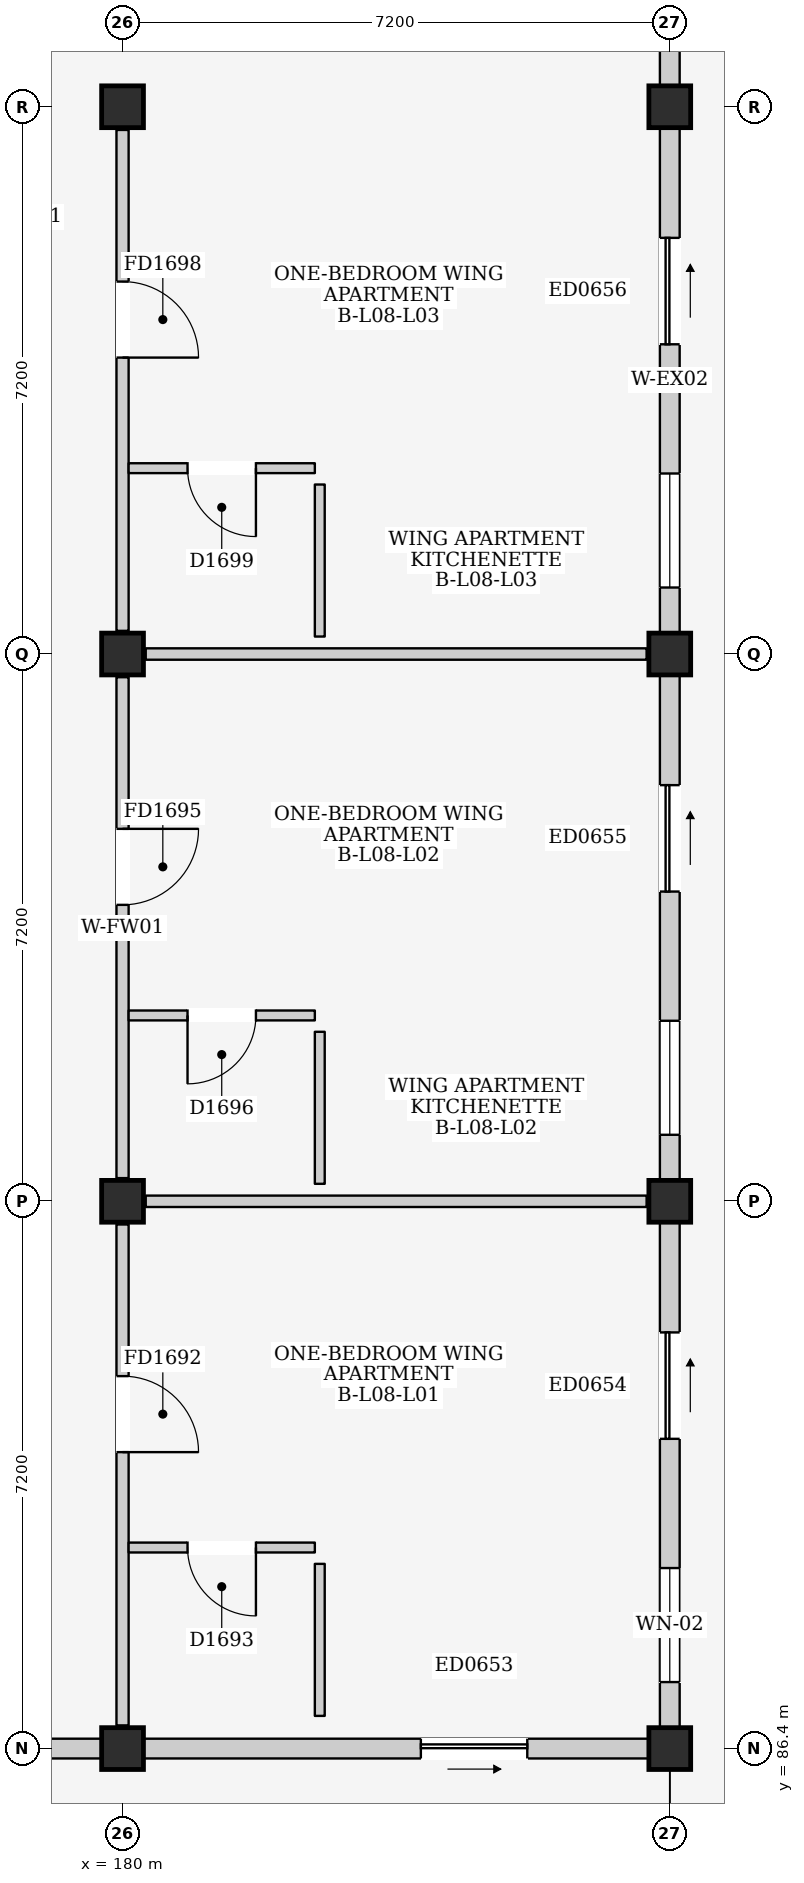
"""IFC4 building model, lengths in metres.
Left out: names, types, materials, properties, quantities, classifications, styles, units other than length and angle.
Written with IfcOpenShell. Run it as: python <this file> out.ifc"""

import sys

from ifc_helpers import new_model, si_unit, direction, frame, frame_2d, origin, origin_2d, place, context, subcontext, project, spatial, rectangle, extrude, element, fill, save


model = new_model("IFC4")
c1 = context("Model", 3, precision=1e-05, world=origin(), true_north=direction((0.0, 1.0)))
c2 = subcontext(c1, "Body", "Model", "MODEL_VIEW")
j1 = project(units=[si_unit("LENGTHUNIT", "METRE"), si_unit("PLANEANGLEUNIT", "RADIAN")], contexts=[c1])
p1 = place(None, origin())
s1 = spatial("IfcSite", under=j1, at=p1, CompositionType="ELEMENT")
p2 = place(p1, origin())
s2 = spatial("IfcBuilding", under=s1, at=p2, CompositionType="ELEMENT")
p3 = place(p2, frame((0.0, 0.0, 28.3)))
s3 = spatial("IfcBuildingStorey", under=s2, at=p3, CompositionType="ELEMENT", Elevation=28.3)
for number, where, z_axis, x_axis in (
    (1, (180.0, 86.4, 0.0), (0.0, 0.0, 1.0), (1.0, 0.0, 0.0)),
    (2, (180.0, 93.6, 0.0), (0.0, 0.0, 1.0), (1.0, 0.0, 0.0)),
    (3, (180.0, 100.8, 0.0), (0.0, 0.0, 1.0), (1.0, 0.0, 0.0)),
    (4, (180.0, 108.0, 0.0), (0.0, 0.0, 1.0), (1.0, 0.0, 0.0)),
    (5, (187.2, 86.4, 0.0), (0.0, 0.0, 1.0), (1.0, 0.0, 0.0)),
    (6, (187.2, 93.6, 0.0), (0.0, 0.0, 1.0), (1.0, 0.0, 0.0)),
    (7, (187.2, 100.8, 0.0), (0.0, 0.0, 1.0), (1.0, 0.0, 0.0)),
    (8, (187.2, 108.0, 0.0), (0.0, 0.0, 1.0), (1.0, 0.0, 0.0)),
):
    element("IfcColumn", number, at=place(p3, frame(where, z_axis=z_axis, x_axis=x_axis)), inside=s3, PredefinedType="COLUMN", context=c2, shape_type="SweptSolid", body=[
        extrude(rectangle(XDim=0.55, YDim=0.55, at=origin_2d()), origin(), (0.0, 0.0, 1.0), 3.2),
    ])
p4 = place(p3, frame((173.075, 86.4, 0.0), z_axis=(0.0, 0.0, 1.0), x_axis=(1.0, 0.0, 0.0)))
e9 = element("IfcWall", 9, at=p4, inside=s3, PredefinedType="ELEMENTEDWALL", context=c2, shape_type="SweptSolid", body=[
    extrude(rectangle(XDim=6.65, YDim=0.26, at=frame_2d((3.325, 0.0))), origin(), (0.0, 0.0, 1.0), 2.335),
])
p5 = place(p4, frame((2.825, 0.0, 1.1)))
e10 = element("IfcOpeningElement", 10, at=p5, cuts=e9, PredefinedType="OPENING", context=c2, shape_type="SweptSolid", body=[
    extrude(rectangle(XDim=1.0, YDim=0.9, at=frame_2d((0.5, 0.45))), frame((0.0, 0.145, 0.0), z_axis=(0.0, -1.0, 0.0), x_axis=(1.0, 0.0, 0.0)), (0.0, 0.0, 1.0), 0.29),
])
p6 = place(p3, frame((180.275, 86.4, 0.0), z_axis=(0.0, 0.0, 1.0), x_axis=(1.0, 0.0, 0.0)))
e11 = element("IfcWall", 11, at=p6, inside=s3, PredefinedType="ELEMENTEDWALL", context=c2, shape_type="SweptSolid", body=[
    extrude(rectangle(XDim=6.65, YDim=0.26, at=frame_2d((3.325, 0.0))), origin(), (0.0, 0.0, 1.0), 2.335),
])
p7 = place(p6, frame((3.65, 0.0, 0.0)))
e12 = element("IfcOpeningElement", 12, at=p7, cuts=e11, PredefinedType="OPENING", context=c2, shape_type="SweptSolid", body=[
    extrude(rectangle(XDim=1.4, YDim=2.1, at=frame_2d((0.7, 1.05))), frame((0.0, 0.145, 0.0), z_axis=(0.0, -1.0, 0.0), x_axis=(1.0, 0.0, 0.0)), (0.0, 0.0, 1.0), 0.29),
])
p8 = place(p3, frame((187.2, 86.675, 0.0), z_axis=(0.0, 0.0, 1.0), x_axis=(0.0, 1.0, 0.0)))
e13 = element("IfcWall", 13, at=p8, inside=s3, PredefinedType="ELEMENTEDWALL", context=c2, shape_type="SweptSolid", body=[
    extrude(rectangle(XDim=6.65, YDim=0.26, at=frame_2d((3.325, 0.0))), origin(), (0.0, 0.0, 1.0), 2.485),
])
p9 = place(p8, frame((3.8, 0.0, 0.0)))
e14 = element("IfcOpeningElement", 14, at=p9, cuts=e13, PredefinedType="OPENING", context=c2, shape_type="SweptSolid", body=[
    extrude(rectangle(XDim=1.4, YDim=2.1, at=frame_2d((0.7, 1.05))), frame((0.0, 0.145, 0.0), z_axis=(0.0, -1.0, 0.0), x_axis=(1.0, 0.0, 0.0)), (0.0, 0.0, 1.0), 0.29),
])
p10 = place(p8, frame((0.6, 0.0, 0.875)))
e15 = element("IfcOpeningElement", 15, at=p10, cuts=e13, PredefinedType="OPENING", context=c2, shape_type="SweptSolid", body=[
    extrude(rectangle(XDim=1.5, YDim=1.5, at=frame_2d((0.75, 0.75))), frame((0.0, 0.145, 0.0), z_axis=(0.0, -1.0, 0.0), x_axis=(1.0, 0.0, 0.0)), (0.0, 0.0, 1.0), 0.29),
])
p11 = place(p3, frame((187.2, 93.875, 0.0), z_axis=(0.0, 0.0, 1.0), x_axis=(0.0, 1.0, 0.0)))
e16 = element("IfcWall", 16, at=p11, inside=s3, PredefinedType="ELEMENTEDWALL", context=c2, shape_type="SweptSolid", body=[
    extrude(rectangle(XDim=6.65, YDim=0.26, at=frame_2d((3.325, 0.0))), origin(), (0.0, 0.0, 1.0), 2.485),
])
p12 = place(p11, frame((3.8, 0.0, 0.0)))
e17 = element("IfcOpeningElement", 17, at=p12, cuts=e16, PredefinedType="OPENING", context=c2, shape_type="SweptSolid", body=[
    extrude(rectangle(XDim=1.4, YDim=2.1, at=frame_2d((0.7, 1.05))), frame((0.0, 0.145, 0.0), z_axis=(0.0, -1.0, 0.0), x_axis=(1.0, 0.0, 0.0)), (0.0, 0.0, 1.0), 0.29),
])
p13 = place(p11, frame((0.6, 0.0, 0.875)))
e18 = element("IfcOpeningElement", 18, at=p13, cuts=e16, PredefinedType="OPENING", context=c2, shape_type="SweptSolid", body=[
    extrude(rectangle(XDim=1.5, YDim=1.5, at=frame_2d((0.75, 0.75))), frame((0.0, 0.145, 0.0), z_axis=(0.0, -1.0, 0.0), x_axis=(1.0, 0.0, 0.0)), (0.0, 0.0, 1.0), 0.29),
])
p14 = place(p3, frame((187.2, 101.075, 0.0), z_axis=(0.0, 0.0, 1.0), x_axis=(0.0, 1.0, 0.0)))
e19 = element("IfcWall", 19, at=p14, inside=s3, PredefinedType="ELEMENTEDWALL", context=c2, shape_type="SweptSolid", body=[
    extrude(rectangle(XDim=6.65, YDim=0.26, at=frame_2d((3.325, 0.0))), origin(), (0.0, 0.0, 1.0), 2.485),
])
p15 = place(p14, frame((3.8, 0.0, 0.0)))
e20 = element("IfcOpeningElement", 20, at=p15, cuts=e19, PredefinedType="OPENING", context=c2, shape_type="SweptSolid", body=[
    extrude(rectangle(XDim=1.4, YDim=2.1, at=frame_2d((0.7, 1.05))), frame((0.0, 0.145, 0.0), z_axis=(0.0, -1.0, 0.0), x_axis=(1.0, 0.0, 0.0)), (0.0, 0.0, 1.0), 0.29),
])
p16 = place(p14, frame((0.6, 0.0, 0.875)))
e21 = element("IfcOpeningElement", 21, at=p16, cuts=e19, PredefinedType="OPENING", context=c2, shape_type="SweptSolid", body=[
    extrude(rectangle(XDim=1.5, YDim=1.5, at=frame_2d((0.75, 0.75))), frame((0.0, 0.145, 0.0), z_axis=(0.0, -1.0, 0.0), x_axis=(1.0, 0.0, 0.0)), (0.0, 0.0, 1.0), 0.29),
])
p17 = place(p3, frame((187.2, 108.275, 0.0), z_axis=(0.0, 0.0, 1.0), x_axis=(0.0, 1.0, 0.0)))
e22 = element("IfcWall", 22, at=p17, inside=s3, PredefinedType="ELEMENTEDWALL", context=c2, shape_type="SweptSolid", body=[
    extrude(rectangle(XDim=6.65, YDim=0.26, at=frame_2d((3.325, 0.0))), origin(), (0.0, 0.0, 1.0), 2.485),
])
p18 = place(p17, frame((3.65, 0.0, 0.0)))
e23 = element("IfcOpeningElement", 23, at=p18, cuts=e22, PredefinedType="OPENING", context=c2, shape_type="SweptSolid", body=[
    extrude(rectangle(XDim=1.4, YDim=2.1, at=frame_2d((0.7, 1.05))), frame((0.0, 0.145, 0.0), z_axis=(0.0, -1.0, 0.0), x_axis=(1.0, 0.0, 0.0)), (0.0, 0.0, 1.0), 0.29),
])
p19 = place(p3, frame((180.0, 86.705, 0.0), z_axis=(0.0, 0.0, 1.0), x_axis=(0.0, 1.0, 0.0)))
e24 = element("IfcWall", 24, at=p19, inside=s3, PredefinedType="PARTITIONING", context=c2, shape_type="SweptSolid", body=[
    extrude(rectangle(XDim=6.59, YDim=0.16, at=frame_2d((3.295, 0.0))), origin(), (0.0, 0.0, 1.0), 2.435),
])
p20 = place(p19, frame((3.595, 0.0, 0.0)))
e25 = element("IfcOpeningElement", 25, at=p20, cuts=e24, PredefinedType="OPENING", context=c2, shape_type="SweptSolid", body=[
    extrude(rectangle(XDim=1.0, YDim=2.15, at=frame_2d((0.5, 1.075))), frame((0.0, 0.095, 0.0), z_axis=(0.0, -1.0, 0.0), x_axis=(1.0, 0.0, 0.0)), (0.0, 0.0, 1.0), 0.19),
])
p21 = place(p3, frame((180.305, 93.6, 0.0), z_axis=(0.0, 0.0, 1.0), x_axis=(1.0, 0.0, 0.0)))
e26 = element("IfcWall", 26, at=p21, inside=s3, PredefinedType="PARTITIONING", context=c2, shape_type="SweptSolid", body=[
    extrude(rectangle(XDim=6.59, YDim=0.15, at=frame_2d((3.295, 0.0))), origin(), (0.0, 0.0, 1.0), 2.335),
])
p22 = place(p3, frame((180.08, 89.045, 0.0), z_axis=(0.0, 0.0, 1.0), x_axis=(1.0, 0.0, 0.0)))
e27 = element("IfcWall", 27, at=p22, inside=s3, PredefinedType="PARTITIONING", context=c2, shape_type="SweptSolid", body=[
    extrude(rectangle(XDim=2.45, YDim=0.13, at=frame_2d((1.225, 0.0))), origin(), (0.0, 0.0, 1.0), 2.95),
])
p23 = place(p22, frame((0.775, 0.0, 0.0)))
e28 = element("IfcOpeningElement", 28, at=p23, cuts=e27, PredefinedType="OPENING", context=c2, shape_type="SweptSolid", body=[
    extrude(rectangle(XDim=0.9, YDim=2.1, at=frame_2d((0.45, 1.05))), frame((0.0, 0.08, 0.0), z_axis=(0.0, -1.0, 0.0), x_axis=(1.0, 0.0, 0.0)), (0.0, 0.0, 1.0), 0.16),
])
p24 = place(p3, frame((182.595, 86.83, 0.0), z_axis=(0.0, 0.0, 1.0), x_axis=(0.0, 1.0, 0.0)))
e29 = element("IfcWall", 29, at=p24, inside=s3, PredefinedType="PARTITIONING", context=c2, shape_type="SweptSolid", body=[
    extrude(rectangle(XDim=2.0, YDim=0.13, at=frame_2d((1.0, 0.0))), origin(), (0.0, 0.0, 1.0), 2.95),
])
p25 = place(p3, frame((180.0, 93.905, 0.0), z_axis=(0.0, 0.0, 1.0), x_axis=(0.0, 1.0, 0.0)))
e30 = element("IfcWall", 30, at=p25, inside=s3, PredefinedType="PARTITIONING", context=c2, shape_type="SweptSolid", body=[
    extrude(rectangle(XDim=6.59, YDim=0.16, at=frame_2d((3.295, 0.0))), origin(), (0.0, 0.0, 1.0), 2.435),
])
p26 = place(p25, frame((3.595, 0.0, 0.0)))
e31 = element("IfcOpeningElement", 31, at=p26, cuts=e30, PredefinedType="OPENING", context=c2, shape_type="SweptSolid", body=[
    extrude(rectangle(XDim=1.0, YDim=2.15, at=frame_2d((0.5, 1.075))), frame((0.0, 0.095, 0.0), z_axis=(0.0, -1.0, 0.0), x_axis=(1.0, 0.0, 0.0)), (0.0, 0.0, 1.0), 0.19),
])
p27 = place(p3, frame((180.305, 100.8, 0.0), z_axis=(0.0, 0.0, 1.0), x_axis=(1.0, 0.0, 0.0)))
e32 = element("IfcWall", 32, at=p27, inside=s3, PredefinedType="PARTITIONING", context=c2, shape_type="SweptSolid", body=[
    extrude(rectangle(XDim=6.59, YDim=0.15, at=frame_2d((3.295, 0.0))), origin(), (0.0, 0.0, 1.0), 2.335),
])
p28 = place(p3, frame((180.08, 96.045, 0.0), z_axis=(0.0, 0.0, 1.0), x_axis=(1.0, 0.0, 0.0)))
e33 = element("IfcWall", 33, at=p28, inside=s3, PredefinedType="PARTITIONING", context=c2, shape_type="SweptSolid", body=[
    extrude(rectangle(XDim=2.45, YDim=0.13, at=frame_2d((1.225, 0.0))), origin(), (0.0, 0.0, 1.0), 2.95),
])
p29 = place(p28, frame((0.775, 0.0, 0.0)))
e34 = element("IfcOpeningElement", 34, at=p29, cuts=e33, PredefinedType="OPENING", context=c2, shape_type="SweptSolid", body=[
    extrude(rectangle(XDim=0.9, YDim=2.1, at=frame_2d((0.45, 1.05))), frame((0.0, 0.08, 0.0), z_axis=(0.0, -1.0, 0.0), x_axis=(1.0, 0.0, 0.0)), (0.0, 0.0, 1.0), 0.16),
])
p30 = place(p3, frame((182.595, 93.83, 0.0), z_axis=(0.0, 0.0, 1.0), x_axis=(0.0, 1.0, 0.0)))
e35 = element("IfcWall", 35, at=p30, inside=s3, PredefinedType="PARTITIONING", context=c2, shape_type="SweptSolid", body=[
    extrude(rectangle(XDim=2.0, YDim=0.13, at=frame_2d((1.0, 0.0))), origin(), (0.0, 0.0, 1.0), 2.95),
])
p31 = place(p3, frame((180.0, 101.105, 0.0), z_axis=(0.0, 0.0, 1.0), x_axis=(0.0, 1.0, 0.0)))
e36 = element("IfcWall", 36, at=p31, inside=s3, PredefinedType="PARTITIONING", context=c2, shape_type="SweptSolid", body=[
    extrude(rectangle(XDim=6.59, YDim=0.16, at=frame_2d((3.295, 0.0))), origin(), (0.0, 0.0, 1.0), 2.435),
])
p32 = place(p31, frame((3.595, 0.0, 0.0)))
e37 = element("IfcOpeningElement", 37, at=p32, cuts=e36, PredefinedType="OPENING", context=c2, shape_type="SweptSolid", body=[
    extrude(rectangle(XDim=1.0, YDim=2.15, at=frame_2d((0.5, 1.075))), frame((0.0, 0.095, 0.0), z_axis=(0.0, -1.0, 0.0), x_axis=(1.0, 0.0, 0.0)), (0.0, 0.0, 1.0), 0.19),
])
p33 = place(p3, frame((180.08, 103.245, 0.0), z_axis=(0.0, 0.0, 1.0), x_axis=(1.0, 0.0, 0.0)))
e38 = element("IfcWall", 38, at=p33, inside=s3, PredefinedType="PARTITIONING", context=c2, shape_type="SweptSolid", body=[
    extrude(rectangle(XDim=2.45, YDim=0.13, at=frame_2d((1.225, 0.0))), origin(), (0.0, 0.0, 1.0), 2.95),
])
p34 = place(p33, frame((0.775, 0.0, 0.0)))
e39 = element("IfcOpeningElement", 39, at=p34, cuts=e38, PredefinedType="OPENING", context=c2, shape_type="SweptSolid", body=[
    extrude(rectangle(XDim=0.9, YDim=2.1, at=frame_2d((0.45, 1.05))), frame((0.0, 0.08, 0.0), z_axis=(0.0, -1.0, 0.0), x_axis=(1.0, 0.0, 0.0)), (0.0, 0.0, 1.0), 0.16),
])
p35 = place(p3, frame((182.595, 101.03, 0.0), z_axis=(0.0, 0.0, 1.0), x_axis=(0.0, 1.0, 0.0)))
e40 = element("IfcWall", 40, at=p35, inside=s3, PredefinedType="PARTITIONING", context=c2, shape_type="SweptSolid", body=[
    extrude(rectangle(XDim=2.0, YDim=0.13, at=frame_2d((1.0, 0.0))), origin(), (0.0, 0.0, 1.0), 2.95),
])
p36 = place(p7, frame((1.4, 0.0, 0.0), z_axis=(0.0, 0.0, 1.0), x_axis=(-1.0, 0.0, 0.0)))
e41 = element("IfcDoor", 41, at=p36, inside=s3, OperationType="SLIDING_TO_RIGHT", PredefinedType="DOOR", context=c2, shape_type="SweptSolid", body=[
    extrude(rectangle(XDim=1.4, YDim=2.1, at=frame_2d((0.7, 1.05))), frame((0.0, 0.025, 0.0), z_axis=(0.0, -1.0, 0.0), x_axis=(1.0, 0.0, 0.0)), (0.0, 0.0, 1.0), 0.05),
])
fill(e12, e41)
p37 = place(p9, frame((1.4, 0.0, 0.0), z_axis=(0.0, 0.0, 1.0), x_axis=(-1.0, 0.0, 0.0)))
e42 = element("IfcDoor", 42, at=p37, inside=s3, OperationType="SLIDING_TO_RIGHT", PredefinedType="DOOR", context=c2, shape_type="SweptSolid", body=[
    extrude(rectangle(XDim=1.4, YDim=2.1, at=frame_2d((0.7, 1.05))), frame((0.0, 0.025, 0.0), z_axis=(0.0, -1.0, 0.0), x_axis=(1.0, 0.0, 0.0)), (0.0, 0.0, 1.0), 0.05),
])
fill(e14, e42)
p38 = place(p10, origin())
e43 = element("IfcWindow", 43, at=p38, inside=s3, PartitioningType="DOUBLE_PANEL_VERTICAL", PredefinedType="WINDOW", context=c2, shape_type="SweptSolid", body=[
    extrude(rectangle(XDim=1.5, YDim=1.5, at=frame_2d((0.75, 0.75))), frame((0.0, 0.03, 0.0), z_axis=(0.0, -1.0, 0.0), x_axis=(1.0, 0.0, 0.0)), (0.0, 0.0, 1.0), 0.06),
])
fill(e15, e43)
p39 = place(p12, frame((1.4, 0.0, 0.0), z_axis=(0.0, 0.0, 1.0), x_axis=(-1.0, 0.0, 0.0)))
e44 = element("IfcDoor", 44, at=p39, inside=s3, OperationType="SLIDING_TO_RIGHT", PredefinedType="DOOR", context=c2, shape_type="SweptSolid", body=[
    extrude(rectangle(XDim=1.4, YDim=2.1, at=frame_2d((0.7, 1.05))), frame((0.0, 0.025, 0.0), z_axis=(0.0, -1.0, 0.0), x_axis=(1.0, 0.0, 0.0)), (0.0, 0.0, 1.0), 0.05),
])
fill(e17, e44)
p40 = place(p13, origin())
e45 = element("IfcWindow", 45, at=p40, inside=s3, PartitioningType="DOUBLE_PANEL_VERTICAL", PredefinedType="WINDOW", context=c2, shape_type="SweptSolid", body=[
    extrude(rectangle(XDim=1.5, YDim=1.5, at=frame_2d((0.75, 0.75))), frame((0.0, 0.03, 0.0), z_axis=(0.0, -1.0, 0.0), x_axis=(1.0, 0.0, 0.0)), (0.0, 0.0, 1.0), 0.06),
])
fill(e18, e45)
p41 = place(p15, frame((1.4, 0.0, 0.0), z_axis=(0.0, 0.0, 1.0), x_axis=(-1.0, 0.0, 0.0)))
e46 = element("IfcDoor", 46, at=p41, inside=s3, OperationType="SLIDING_TO_RIGHT", PredefinedType="DOOR", context=c2, shape_type="SweptSolid", body=[
    extrude(rectangle(XDim=1.4, YDim=2.1, at=frame_2d((0.7, 1.05))), frame((0.0, 0.025, 0.0), z_axis=(0.0, -1.0, 0.0), x_axis=(1.0, 0.0, 0.0)), (0.0, 0.0, 1.0), 0.05),
])
fill(e20, e46)
p42 = place(p16, origin())
e47 = element("IfcWindow", 47, at=p42, inside=s3, PartitioningType="DOUBLE_PANEL_VERTICAL", PredefinedType="WINDOW", context=c2, shape_type="SweptSolid", body=[
    extrude(rectangle(XDim=1.5, YDim=1.5, at=frame_2d((0.75, 0.75))), frame((0.0, 0.03, 0.0), z_axis=(0.0, -1.0, 0.0), x_axis=(1.0, 0.0, 0.0)), (0.0, 0.0, 1.0), 0.06),
])
fill(e21, e47)
p43 = place(p20, frame((1.0, 0.0, 0.0), z_axis=(0.0, 0.0, 1.0), x_axis=(-1.0, 0.0, 0.0)))
e48 = element("IfcDoor", 48, at=p43, inside=s3, OperationType="SINGLE_SWING_RIGHT", PredefinedType="DOOR", context=c2, shape_type="SweptSolid", body=[
    extrude(rectangle(XDim=1.0, YDim=2.15, at=frame_2d((0.5, 1.075))), frame((0.0, 0.025, 0.0), z_axis=(0.0, -1.0, 0.0), x_axis=(1.0, 0.0, 0.0)), (0.0, 0.0, 1.0), 0.05),
])
fill(e25, e48)
p44 = place(p23, frame((0.9, 0.0, 0.0), z_axis=(0.0, 0.0, 1.0), x_axis=(-1.0, 0.0, 0.0)))
e49 = element("IfcDoor", 49, at=p44, inside=s3, OperationType="SINGLE_SWING_LEFT", PredefinedType="DOOR", context=c2, shape_type="SweptSolid", body=[
    extrude(rectangle(XDim=0.9, YDim=2.1, at=frame_2d((0.45, 1.05))), frame((0.0, 0.025, 0.0), z_axis=(0.0, -1.0, 0.0), x_axis=(1.0, 0.0, 0.0)), (0.0, 0.0, 1.0), 0.05),
])
fill(e28, e49)
p45 = place(p26, frame((1.0, 0.0, 0.0), z_axis=(0.0, 0.0, 1.0), x_axis=(-1.0, 0.0, 0.0)))
e50 = element("IfcDoor", 50, at=p45, inside=s3, OperationType="SINGLE_SWING_LEFT", PredefinedType="DOOR", context=c2, shape_type="SweptSolid", body=[
    extrude(rectangle(XDim=1.0, YDim=2.15, at=frame_2d((0.5, 1.075))), frame((0.0, 0.025, 0.0), z_axis=(0.0, -1.0, 0.0), x_axis=(1.0, 0.0, 0.0)), (0.0, 0.0, 1.0), 0.05),
])
fill(e31, e50)
p46 = place(p29, frame((0.9, 0.0, 0.0), z_axis=(0.0, 0.0, 1.0), x_axis=(-1.0, 0.0, 0.0)))
e51 = element("IfcDoor", 51, at=p46, inside=s3, OperationType="SINGLE_SWING_RIGHT", PredefinedType="DOOR", context=c2, shape_type="SweptSolid", body=[
    extrude(rectangle(XDim=0.9, YDim=2.1, at=frame_2d((0.45, 1.05))), frame((0.0, 0.025, 0.0), z_axis=(0.0, -1.0, 0.0), x_axis=(1.0, 0.0, 0.0)), (0.0, 0.0, 1.0), 0.05),
])
fill(e34, e51)
p47 = place(p32, frame((1.0, 0.0, 0.0), z_axis=(0.0, 0.0, 1.0), x_axis=(-1.0, 0.0, 0.0)))
e52 = element("IfcDoor", 52, at=p47, inside=s3, OperationType="SINGLE_SWING_RIGHT", PredefinedType="DOOR", context=c2, shape_type="SweptSolid", body=[
    extrude(rectangle(XDim=1.0, YDim=2.15, at=frame_2d((0.5, 1.075))), frame((0.0, 0.025, 0.0), z_axis=(0.0, -1.0, 0.0), x_axis=(1.0, 0.0, 0.0)), (0.0, 0.0, 1.0), 0.05),
])
fill(e37, e52)
p48 = place(p34, frame((0.9, 0.0, 0.0), z_axis=(0.0, 0.0, 1.0), x_axis=(-1.0, 0.0, 0.0)))
e53 = element("IfcDoor", 53, at=p48, inside=s3, OperationType="SINGLE_SWING_LEFT", PredefinedType="DOOR", context=c2, shape_type="SweptSolid", body=[
    extrude(rectangle(XDim=0.9, YDim=2.1, at=frame_2d((0.45, 1.05))), frame((0.0, 0.025, 0.0), z_axis=(0.0, -1.0, 0.0), x_axis=(1.0, 0.0, 0.0)), (0.0, 0.0, 1.0), 0.05),
])
fill(e39, e53)
save(model, sys.argv[1])
